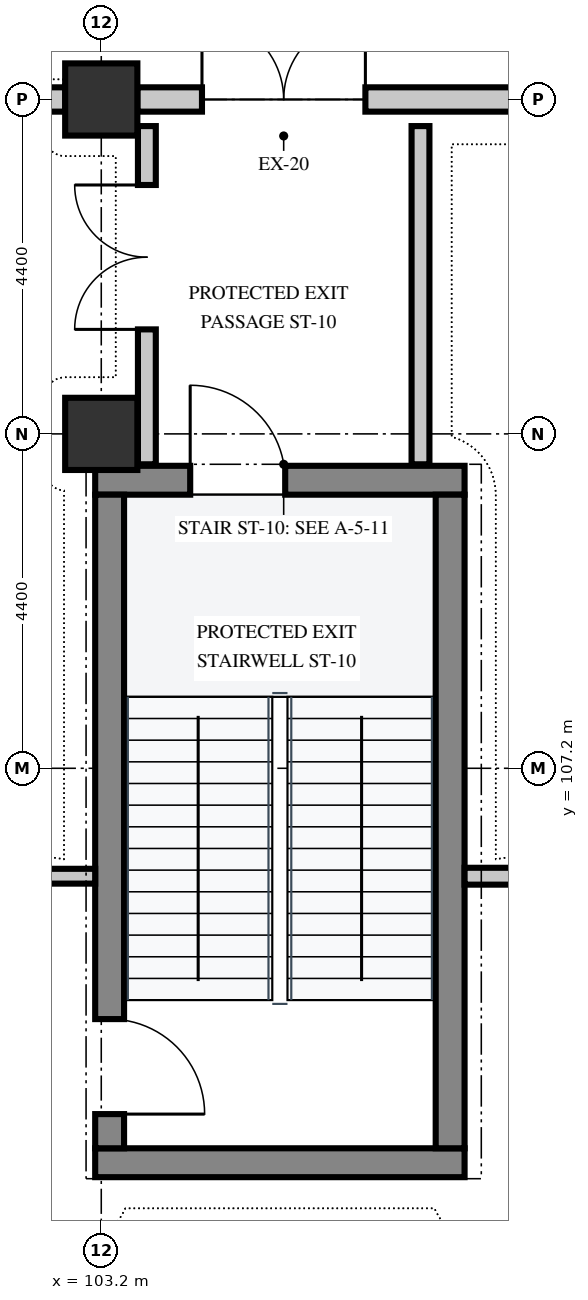
"""IFC4 building model, lengths in metres.
Left out: names, types, materials, properties, quantities, classifications, styles, units other than length and angle.
Written with IfcOpenShell. Run it as: python <this file> out.ifc"""

import sys

from ifc_helpers import new_model, si_unit, direction, frame, frame_2d, origin, origin_2d, place, context, subcontext, project, spatial, rectangle, extrude, element, fill, save


model = new_model("IFC4")
c1 = context("Model", 3, precision=1e-05, world=origin(), true_north=direction((0.0, 1.0)))
c2 = subcontext(c1, "Body", "Model", "MODEL_VIEW")
j1 = project(units=[si_unit("LENGTHUNIT", "METRE"), si_unit("PLANEANGLEUNIT", "RADIAN")], contexts=[c1])
p1 = place(None, origin())
s1 = spatial("IfcSite", under=j1, at=p1, CompositionType="ELEMENT")
p2 = place(p1, origin())
s2 = spatial("IfcBuilding", under=s1, at=p2, CompositionType="ELEMENT")
p3 = place(p2, origin())
s3 = spatial("IfcBuildingStorey", under=s2, at=p3, CompositionType="ELEMENT", Elevation=0.0)
for number, where, z_axis, x_axis in (
    (1, (103.2, 111.6, -0.3), (0.0, 0.0, 1.0), (1.0, 0.0, 0.0)),
    (2, (103.2, 116.0, -0.3), (0.0, 0.0, 1.0), (1.0, 0.0, 0.0)),
):
    element("IfcColumn", number, at=place(p3, frame(where, z_axis=z_axis, x_axis=x_axis)), inside=s3, PredefinedType="COLUMN", context=c2, shape_type="SweptSolid", body=[
        extrude(rectangle(XDim=0.95, YDim=0.95, at=origin_2d()), origin(), (0.0, 0.0, 1.0), 5.7),
    ])
p4 = place(p3, frame((94.673, 116.0, 0.0), z_axis=(0.0, 0.0, 1.0), x_axis=(1.0, 0.0, 0.0)))
e3 = element("IfcWall", 3, at=p4, inside=s3, PredefinedType="SOLIDWALL", context=c2, shape_type="SweptSolid", body=[
    extrude(rectangle(XDim=8.054, YDim=0.32, at=frame_2d((4.027, 0.0))), origin(), (0.0, 0.0, 1.0), 5.09),
])
p5 = place(p4, frame((3.177, 0.0, 1.1)))
e4 = element("IfcOpeningElement", 4, at=p5, cuts=e3, PredefinedType="OPENING", context=c2, shape_type="SweptSolid", body=[
    extrude(rectangle(XDim=1.7, YDim=1.8, at=frame_2d((0.85, 0.9))), frame((0.0, 0.172, 0.0), z_axis=(0.0, -1.0, 0.0), x_axis=(1.0, 0.0, 0.0)), (0.0, 0.0, 1.0), 0.344),
])
p6 = place(p3, frame((103.675, 116.0, 0.0), z_axis=(0.0, 0.0, 1.0), x_axis=(1.0, 0.0, 0.0)))
e5 = element("IfcWall", 5, at=p6, inside=s3, PredefinedType="SOLIDWALL", context=c2, shape_type="SweptSolid", body=[
    extrude(rectangle(XDim=8.05, YDim=0.32, at=frame_2d((4.025, 0.0))), origin(), (0.0, 0.0, 1.0), 5.09),
])
p7 = place(p6, frame((0.85, 0.0, 0.0)))
e6 = element("IfcOpeningElement", 6, at=p7, cuts=e5, PredefinedType="OPENING", context=c2, shape_type="SweptSolid", body=[
    extrude(rectangle(XDim=2.15, YDim=2.3, at=frame_2d((1.075, 1.15))), frame((0.0, 0.172, 0.0), z_axis=(0.0, -1.0, 0.0), x_axis=(1.0, 0.0, 0.0)), (0.0, 0.0, 1.0), 0.344),
])
p8 = place(p3, frame((103.12, 102.01, 0.0), z_axis=(0.0, 0.0, 1.0), x_axis=(1.0, 0.0, 0.0)))
e7 = element("IfcWall", 7, at=p8, inside=s3, PredefinedType="SHEAR", context=c2, shape_type="SweptSolid", body=[
    extrude(rectangle(XDim=4.86, YDim=0.38, at=frame_2d((2.43, 0.0))), origin(), (0.0, 0.0, 1.0), 5.09),
])
p9 = place(p3, frame((103.12, 110.99, 0.0), z_axis=(0.0, 0.0, 1.0), x_axis=(1.0, 0.0, 0.0)))
e8 = element("IfcWall", 8, at=p9, inside=s3, PredefinedType="SHEAR", context=c2, shape_type="SweptSolid", body=[
    extrude(rectangle(XDim=4.86, YDim=0.38, at=frame_2d((2.43, 0.0))), origin(), (0.0, 0.0, 1.0), 5.09),
])
p10 = place(p9, frame((1.25, 0.0, 0.0)))
e9 = element("IfcOpeningElement", 9, at=p10, cuts=e8, PredefinedType="OPENING", context=c2, shape_type="SweptSolid", body=[
    extrude(rectangle(XDim=1.25, YDim=2.2, at=frame_2d((0.625, 1.1))), frame((0.0, 0.202, 0.0), z_axis=(0.0, -1.0, 0.0), x_axis=(1.0, 0.0, 0.0)), (0.0, 0.0, 1.0), 0.404),
])
p11 = place(p3, frame((107.79, 102.2, 0.0), z_axis=(0.0, 0.0, 1.0), x_axis=(0.0, 1.0, 0.0)))
e10 = element("IfcWall", 10, at=p11, inside=s3, PredefinedType="SHEAR", context=c2, shape_type="SweptSolid", body=[
    extrude(rectangle(XDim=8.6, YDim=0.38, at=frame_2d((4.3, 0.0))), origin(), (0.0, 0.0, 1.0), 5.09),
])
p12 = place(p3, frame((103.31, 102.2, 0.0), z_axis=(0.0, 0.0, 1.0), x_axis=(0.0, 1.0, 0.0)))
e11 = element("IfcWall", 11, at=p12, inside=s3, PredefinedType="SHEAR", context=c2, shape_type="SweptSolid", body=[
    extrude(rectangle(XDim=8.6, YDim=0.38, at=frame_2d((4.3, 0.0))), origin(), (0.0, 0.0, 1.0), 5.09),
])
p13 = place(p12, frame((0.45, 0.0, 0.0)))
e12 = element("IfcOpeningElement", 12, at=p13, cuts=e11, PredefinedType="OPENING", context=c2, shape_type="SweptSolid", body=[
    extrude(rectangle(XDim=1.25, YDim=2.2, at=frame_2d((0.625, 1.1))), frame((0.0, 0.202, 0.0), z_axis=(0.0, -1.0, 0.0), x_axis=(1.0, 0.0, 0.0)), (0.0, 0.0, 1.0), 0.404),
])
p14 = place(p3, frame((103.8, 111.2, 0.0), z_axis=(0.0, 0.0, 1.0), x_axis=(0.0, 1.0, 0.0)))
e13 = element("IfcWall", 13, at=p14, inside=s3, PredefinedType="PARTITIONING", context=c2, shape_type="SweptSolid", body=[
    extrude(rectangle(XDim=4.45, YDim=0.235, at=frame_2d((2.225, 0.0))), origin(), (0.0, 0.0, 1.0), 4.03),
])
p15 = place(p14, frame((1.775, 0.0, 0.0)))
e14 = element("IfcOpeningElement", 14, at=p15, cuts=e13, PredefinedType="OPENING", context=c2, shape_type="SweptSolid", body=[
    extrude(rectangle(XDim=1.9, YDim=2.25, at=frame_2d((0.95, 1.125))), frame((0.0, 0.129, 0.0), z_axis=(0.0, -1.0, 0.0), x_axis=(1.0, 0.0, 0.0)), (0.0, 0.0, 1.0), 0.259),
])
p16 = place(p3, frame((107.4, 111.2, 0.0), z_axis=(0.0, 0.0, 1.0), x_axis=(0.0, 1.0, 0.0)))
e15 = element("IfcWall", 15, at=p16, inside=s3, PredefinedType="PARTITIONING", context=c2, shape_type="SweptSolid", body=[
    extrude(rectangle(XDim=4.45, YDim=0.235, at=frame_2d((2.225, 0.0))), origin(), (0.0, 0.0, 1.0), 4.03),
])
p17 = place(p3, frame((121.08, 105.78, 0.0), z_axis=(0.0, 0.0, 1.0), x_axis=(-1.0, 0.0, 0.0)))
e16 = element("IfcWall", 16, at=p17, inside=s3, PredefinedType="PARTITIONING", context=c2, shape_type="SweptSolid", body=[
    extrude(rectangle(XDim=13.1, YDim=0.222, at=frame_2d((6.55, 0.0))), origin(), (0.0, 0.0, 1.0), 4.03),
])
p18 = place(p17, frame((5.695, 0.0, 0.0)))
e17 = element("IfcOpeningElement", 17, at=p18, cuts=e16, PredefinedType="OPENING", context=c2, shape_type="SweptSolid", body=[
    extrude(rectangle(XDim=1.05, YDim=2.1, at=frame_2d((0.525, 1.05))), frame((0.0, 0.123, 0.0), z_axis=(0.0, -1.0, 0.0), x_axis=(1.0, 0.0, 0.0)), (0.0, 0.0, 1.0), 0.246),
])
p19 = place(p3, frame((103.12, 105.78, 0.0), z_axis=(0.0, 0.0, 1.0), x_axis=(-1.0, 0.0, 0.0)))
e18 = element("IfcWall", 18, at=p19, inside=s3, PredefinedType="PARTITIONING", context=c2, shape_type="SweptSolid", body=[
    extrude(rectangle(XDim=51.095, YDim=0.195, at=frame_2d((25.548, 0.0))), origin(), (0.0, 0.0, 1.0), 4.03),
])
p20 = place(p19, frame((24.187, 0.0, 0.0)))
e19 = element("IfcOpeningElement", 19, at=p20, cuts=e18, PredefinedType="OPENING", context=c2, shape_type="SweptSolid", body=[
    extrude(rectangle(XDim=2.3, YDim=2.5, at=frame_2d((1.15, 1.25))), frame((0.0, 0.109, 0.0), z_axis=(0.0, -1.0, 0.0), x_axis=(1.0, 0.0, 0.0)), (0.0, 0.0, 1.0), 0.219),
])
p21 = place(p7, origin())
e20 = element("IfcDoor", 20, at=p21, inside=s3, OperationType="DOUBLE_DOOR_SINGLE_SWING", PredefinedType="DOOR", context=c2, shape_type="SweptSolid", body=[
    extrude(rectangle(XDim=2.15, YDim=2.3, at=frame_2d((1.075, 1.15))), frame((0.0, 0.025, 0.0), z_axis=(0.0, -1.0, 0.0), x_axis=(1.0, 0.0, 0.0)), (0.0, 0.0, 1.0), 0.05),
])
fill(e6, e20)
p22 = place(p13, frame((1.25, 0.0, 0.0), z_axis=(0.0, 0.0, 1.0), x_axis=(-1.0, 0.0, 0.0)))
e21 = element("IfcDoor", 21, at=p22, inside=s3, OperationType="SINGLE_SWING_RIGHT", PredefinedType="DOOR", context=c2, shape_type="SweptSolid", body=[
    extrude(rectangle(XDim=1.25, YDim=2.2, at=frame_2d((0.625, 1.1))), frame((0.0, 0.025, 0.0), z_axis=(0.0, -1.0, 0.0), x_axis=(1.0, 0.0, 0.0)), (0.0, 0.0, 1.0), 0.05),
])
fill(e12, e21)
p23 = place(p10, origin())
e22 = element("IfcDoor", 22, at=p23, inside=s3, OperationType="SINGLE_SWING_LEFT", PredefinedType="DOOR", context=c2, shape_type="SweptSolid", body=[
    extrude(rectangle(XDim=1.25, YDim=2.2, at=frame_2d((0.625, 1.1))), frame((0.0, 0.025, 0.0), z_axis=(0.0, -1.0, 0.0), x_axis=(1.0, 0.0, 0.0)), (0.0, 0.0, 1.0), 0.05),
])
fill(e9, e22)
p24 = place(p15, origin())
e23 = element("IfcDoor", 23, at=p24, inside=s3, OperationType="DOUBLE_DOOR_SINGLE_SWING", PredefinedType="DOOR", context=c2, shape_type="SweptSolid", body=[
    extrude(rectangle(XDim=1.9, YDim=2.25, at=frame_2d((0.95, 1.125))), frame((0.0, 0.025, 0.0), z_axis=(0.0, -1.0, 0.0), x_axis=(1.0, 0.0, 0.0)), (0.0, 0.0, 1.0), 0.05),
])
fill(e14, e23)
save(model, sys.argv[1])
